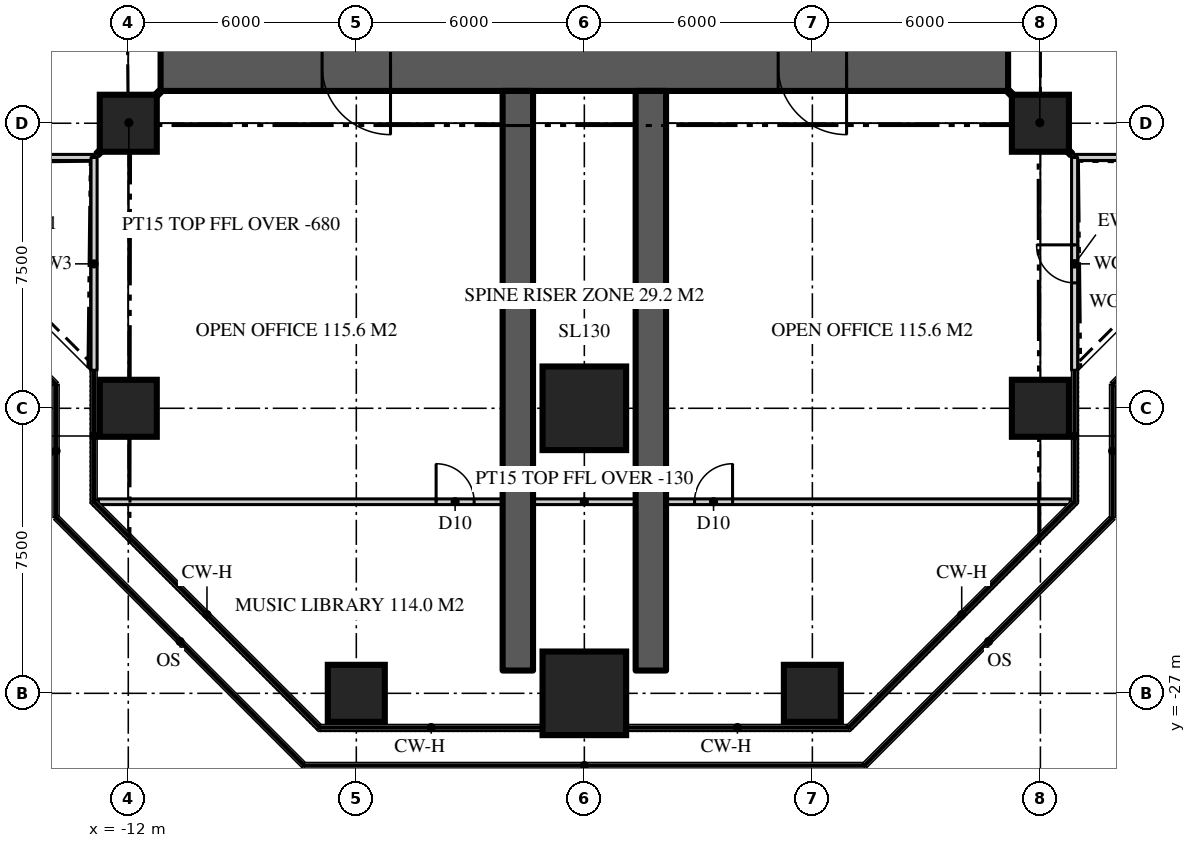
"""IFC4 building model, lengths in metres.
Left out: names, types, materials, properties, quantities, classifications, styles, units other than length and angle.
Written with IfcOpenShell. Run it as: python <this file> out.ifc"""

import sys

from ifc_helpers import new_model, si_unit, direction, frame, frame_2d, origin, origin_2d, place, context, subcontext, project, spatial, rectangle, extrude, element, fill, save


model = new_model("IFC4")
c1 = context("Model", 3, precision=1e-05, world=origin(), true_north=direction((0.0, 1.0)))
c2 = subcontext(c1, "Body", "Model", "MODEL_VIEW")
j1 = project(units=[si_unit("LENGTHUNIT", "METRE"), si_unit("PLANEANGLEUNIT", "RADIAN")], contexts=[c1])
p1 = place(None, origin())
s1 = spatial("IfcSite", under=j1, at=p1, CompositionType="ELEMENT")
p2 = place(p1, origin())
s2 = spatial("IfcBuilding", under=s1, at=p2, CompositionType="ELEMENT")
p3 = place(p2, frame((0.0, 0.0, 204.9)))
s3 = spatial("IfcBuildingStorey", under=s2, at=p3, CompositionType="ELEMENT", Elevation=204.9)
p4 = place(p3, frame((11.15, -10.5, 0.0), z_axis=(0.0, 0.0, 1.0), x_axis=(-1.0, 0.0, 0.0)))
e1 = element("IfcWall", 1, at=p4, inside=s3, PredefinedType="SHEAR", context=c2, shape_type="SweptSolid", body=[
    extrude(rectangle(XDim=22.3, YDim=1.3, at=frame_2d((11.15, 0.0))), origin(), (0.0, 0.0, 1.0), 3.9),
])
p5 = place(p4, frame((16.25, 0.0, 0.0)))
e2 = element("IfcOpeningElement", 2, at=p5, cuts=e1, PredefinedType="OPENING", context=c2, shape_type="SweptSolid", body=[
    extrude(rectangle(XDim=1.8, YDim=2.2, at=frame_2d((0.9, 1.1))), frame((0.0, 0.66, 0.0), z_axis=(0.0, -1.0, 0.0), x_axis=(1.0, 0.0, 0.0)), (0.0, 0.0, 1.0), 1.32),
])
p6 = place(p4, frame((4.25, 0.0, 0.0)))
e3 = element("IfcOpeningElement", 3, at=p6, cuts=e1, PredefinedType="OPENING", context=c2, shape_type="SweptSolid", body=[
    extrude(rectangle(XDim=1.8, YDim=2.2, at=frame_2d((0.9, 1.1))), frame((0.0, 0.66, 0.0), z_axis=(0.0, -1.0, 0.0), x_axis=(1.0, 0.0, 0.0)), (0.0, 0.0, 1.0), 1.32),
])
for number, where, z_axis, x_axis in (
    (4, (-1.75, -11.15, 0.0), (0.0, 0.0, 1.0), (0.0, -1.0, 0.0)),
    (5, (1.75, -11.15, 0.0), (0.0, 0.0, 1.0), (0.0, -1.0, 0.0)),
):
    element("IfcWall", number, at=place(p3, frame(where, z_axis=z_axis, x_axis=x_axis)), inside=s3, PredefinedType="SHEAR", context=c2, shape_type="SweptSolid", body=[
        extrude(rectangle(XDim=15.25, YDim=0.8, at=frame_2d((7.625, 0.0))), origin(), (0.0, 0.0, 1.0), 3.9),
    ])
p7 = place(p3, frame((-6.0, -27.0, 0.0), z_axis=(0.0, 0.0, 1.0), x_axis=(1.0, 0.0, 0.0)))
e6 = element("IfcColumn", 6, at=p7, inside=s3, PredefinedType="COLUMN", context=c2, shape_type="SweptSolid", body=[
    extrude(rectangle(XDim=1.5, YDim=1.5, at=origin_2d()), origin(), (0.0, 0.0, 1.0), 3.9),
])
p8 = place(p3, frame((0.0, -27.0, 0.0), z_axis=(0.0, 0.0, 1.0), x_axis=(1.0, 0.0, 0.0)))
e7 = element("IfcColumn", 7, at=p8, inside=s3, PredefinedType="COLUMN", context=c2, shape_type="SweptSolid", body=[
    extrude(rectangle(XDim=2.2, YDim=2.2, at=origin_2d()), origin(), (0.0, 0.0, 1.0), 3.9),
])
for number, where, z_axis, x_axis in (
    (8, (6.0, -27.0, 0.0), (0.0, 0.0, 1.0), (1.0, 0.0, 0.0)),
    (9, (-12.0, -19.5, 0.0), (0.0, 0.0, 1.0), (1.0, 0.0, 0.0)),
):
    element("IfcColumn", number, at=place(p3, frame(where, z_axis=z_axis, x_axis=x_axis)), inside=s3, PredefinedType="COLUMN", context=c2, shape_type="SweptSolid", body=[
        extrude(rectangle(XDim=1.5, YDim=1.5, at=origin_2d()), origin(), (0.0, 0.0, 1.0), 3.9),
    ])
p9 = place(p3, frame((0.0, -19.5, 0.0), z_axis=(0.0, 0.0, 1.0), x_axis=(1.0, 0.0, 0.0)))
e10 = element("IfcColumn", 10, at=p9, inside=s3, PredefinedType="COLUMN", context=c2, shape_type="SweptSolid", body=[
    extrude(rectangle(XDim=2.2, YDim=2.2, at=origin_2d()), origin(), (0.0, 0.0, 1.0), 3.9),
])
for number, where, z_axis, x_axis in (
    (11, (12.0, -19.5, 0.0), (0.0, 0.0, 1.0), (1.0, 0.0, 0.0)),
    (12, (-12.0, -12.0, 0.0), (0.0, 0.0, 1.0), (1.0, 0.0, 0.0)),
    (13, (12.0, -12.0, 0.0), (0.0, 0.0, 1.0), (1.0, 0.0, 0.0)),
):
    element("IfcColumn", number, at=place(p3, frame(where, z_axis=z_axis, x_axis=x_axis)), inside=s3, PredefinedType="COLUMN", context=c2, shape_type="SweptSolid", body=[
        extrude(rectangle(XDim=1.5, YDim=1.5, at=origin_2d()), origin(), (0.0, 0.0, 1.0), 3.9),
    ])
p10 = place(p3, frame((12.9, -12.9, 0.0), z_axis=(0.0, 0.0, 1.0), x_axis=(1.0, 0.0, 0.0)))
e14 = element("IfcWall", 14, at=p10, inside=s3, PredefinedType="SOLIDWALL", context=c2, shape_type="SweptSolid", body=[
    extrude(rectangle(XDim=5.6, YDim=0.16, at=frame_2d((2.8, 0.0))), origin(), (0.0, 0.0, 1.0), 3.77),
])
p11 = place(p3, frame((-18.5, -12.9, 0.0), z_axis=(0.0, 0.0, 1.0), x_axis=(1.0, 0.0, 0.0)))
e15 = element("IfcWall", 15, at=p11, inside=s3, PredefinedType="SOLIDWALL", context=c2, shape_type="SweptSolid", body=[
    extrude(rectangle(XDim=5.6, YDim=0.16, at=frame_2d((2.8, 0.0))), origin(), (0.0, 0.0, 1.0), 3.77),
])
p12 = place(p11, frame((2.3, 0.0, 0.0)))
e16 = element("IfcOpeningElement", 16, at=p12, cuts=e15, PredefinedType="OPENING", context=c2, shape_type="SweptSolid", body=[
    extrude(rectangle(XDim=1.0, YDim=2.2, at=frame_2d((0.5, 1.1))), frame((0.0, 0.09, 0.0), z_axis=(0.0, -1.0, 0.0), x_axis=(1.0, 0.0, 0.0)), (0.0, 0.0, 1.0), 0.18),
])
p13 = place(p3, frame((-12.9, -12.9, 0.0), z_axis=(0.0, 0.0, 1.0), x_axis=(0.0, -1.0, 0.0)))
e17 = element("IfcWall", 17, at=p13, inside=s3, PredefinedType="SOLIDWALL", context=c2, shape_type="SweptSolid", body=[
    extrude(rectangle(XDim=5.6, YDim=0.16, at=frame_2d((2.8, 0.0))), origin(), (0.0, 0.0, 1.0), 3.77),
])
p14 = place(p3, frame((12.9, -18.5, 0.0), z_axis=(0.0, 0.0, 1.0), x_axis=(0.0, 1.0, 0.0)))
e18 = element("IfcWall", 18, at=p14, inside=s3, PredefinedType="SOLIDWALL", context=c2, shape_type="SweptSolid", body=[
    extrude(rectangle(XDim=5.6, YDim=0.16, at=frame_2d((2.8, 0.0))), origin(), (0.0, 0.0, 1.0), 3.77),
])
p15 = place(p14, frame((2.3, 0.0, 0.0)))
e19 = element("IfcOpeningElement", 19, at=p15, cuts=e18, PredefinedType="OPENING", context=c2, shape_type="SweptSolid", body=[
    extrude(rectangle(XDim=1.0, YDim=2.2, at=frame_2d((0.5, 1.1))), frame((0.0, 0.09, 0.0), z_axis=(0.0, -1.0, 0.0), x_axis=(1.0, 0.0, 0.0)), (0.0, 0.0, 1.0), 0.18),
])
p16 = place(p3, frame((-12.786, -21.959, 0.0), z_axis=(0.0, 0.0, 1.0), x_axis=(1.0, 0.0, 0.0)))
e20 = element("IfcWall", 20, at=p16, inside=s3, PredefinedType="PARTITIONING", context=c2, shape_type="SweptSolid", body=[
    extrude(rectangle(XDim=25.573, YDim=0.15, at=frame_2d((12.786, 0.0))), origin(), (0.0, 0.0, 1.0), 3.77),
])
p17 = place(p16, frame((15.687, 0.0, 0.0)))
e21 = element("IfcOpeningElement", 21, at=p17, cuts=e20, PredefinedType="OPENING", context=c2, shape_type="SweptSolid", body=[
    extrude(rectangle(XDim=1.0, YDim=2.2, at=frame_2d((0.5, 1.1))), frame((0.0, 0.085, 0.0), z_axis=(0.0, -1.0, 0.0), x_axis=(1.0, 0.0, 0.0)), (0.0, 0.0, 1.0), 0.17),
])
p18 = place(p16, frame((8.886, 0.0, 0.0)))
e22 = element("IfcOpeningElement", 22, at=p18, cuts=e20, PredefinedType="OPENING", context=c2, shape_type="SweptSolid", body=[
    extrude(rectangle(XDim=1.0, YDim=2.2, at=frame_2d((0.5, 1.1))), frame((0.0, 0.085, 0.0), z_axis=(0.0, -1.0, 0.0), x_axis=(1.0, 0.0, 0.0)), (0.0, 0.0, 1.0), 0.17),
])
for number, where, z_axis, x_axis in (
    (23, (-11.15, -11.15, 0.0), (0.0, 0.0, 1.0), (-0.707, -0.707, 0.0)),
    (24, (11.15, -11.15, 0.0), (0.0, 0.0, 1.0), (0.707, -0.707, 0.0)),
):
    element("IfcWall", number, at=place(p3, frame(where, z_axis=z_axis, x_axis=x_axis)), inside=s3, PredefinedType="PARTITIONING", context=c2, shape_type="SweptSolid", body=[
        extrude(rectangle(XDim=2.362, YDim=0.15, at=frame_2d((1.181, 0.0))), origin(), (0.0, 0.0, 1.0), 3.22),
    ])
p19 = place(p15, origin())
e25 = element("IfcDoor", 25, at=p19, inside=s3, OperationType="SINGLE_SWING_RIGHT", PredefinedType="DOOR", context=c2, shape_type="SweptSolid", body=[
    extrude(rectangle(XDim=1.0, YDim=2.2, at=frame_2d((0.5, 1.1))), frame((0.0, 0.025, 0.0), z_axis=(0.0, -1.0, 0.0), x_axis=(1.0, 0.0, 0.0)), (0.0, 0.0, 1.0), 0.05),
])
fill(e19, e25)
p20 = place(p5, origin())
e26 = element("IfcDoor", 26, at=p20, inside=s3, OperationType="DOUBLE_DOOR_DOUBLE_SWING", PredefinedType="DOOR", context=c2, shape_type="SweptSolid", body=[
    extrude(rectangle(XDim=1.8, YDim=2.2, at=frame_2d((0.9, 1.1))), frame((0.0, 0.025, 0.0), z_axis=(0.0, -1.0, 0.0), x_axis=(1.0, 0.0, 0.0)), (0.0, 0.0, 1.0), 0.05),
])
fill(e2, e26)
p21 = place(p6, origin())
e27 = element("IfcDoor", 27, at=p21, inside=s3, OperationType="DOUBLE_DOOR_DOUBLE_SWING", PredefinedType="DOOR", context=c2, shape_type="SweptSolid", body=[
    extrude(rectangle(XDim=1.8, YDim=2.2, at=frame_2d((0.9, 1.1))), frame((0.0, 0.025, 0.0), z_axis=(0.0, -1.0, 0.0), x_axis=(1.0, 0.0, 0.0)), (0.0, 0.0, 1.0), 0.05),
])
fill(e3, e27)
p22 = place(p17, origin())
e28 = element("IfcDoor", 28, at=p22, inside=s3, OperationType="SINGLE_SWING_RIGHT", PredefinedType="DOOR", context=c2, shape_type="SweptSolid", body=[
    extrude(rectangle(XDim=1.0, YDim=2.2, at=frame_2d((0.5, 1.1))), frame((0.0, 0.025, 0.0), z_axis=(0.0, -1.0, 0.0), x_axis=(1.0, 0.0, 0.0)), (0.0, 0.0, 1.0), 0.05),
])
fill(e21, e28)
p23 = place(p18, origin())
e29 = element("IfcDoor", 29, at=p23, inside=s3, OperationType="SINGLE_SWING_LEFT", PredefinedType="DOOR", context=c2, shape_type="SweptSolid", body=[
    extrude(rectangle(XDim=1.0, YDim=2.2, at=frame_2d((0.5, 1.1))), frame((0.0, 0.025, 0.0), z_axis=(0.0, -1.0, 0.0), x_axis=(1.0, 0.0, 0.0)), (0.0, 0.0, 1.0), 0.05),
])
fill(e22, e29)
save(model, sys.argv[1])
